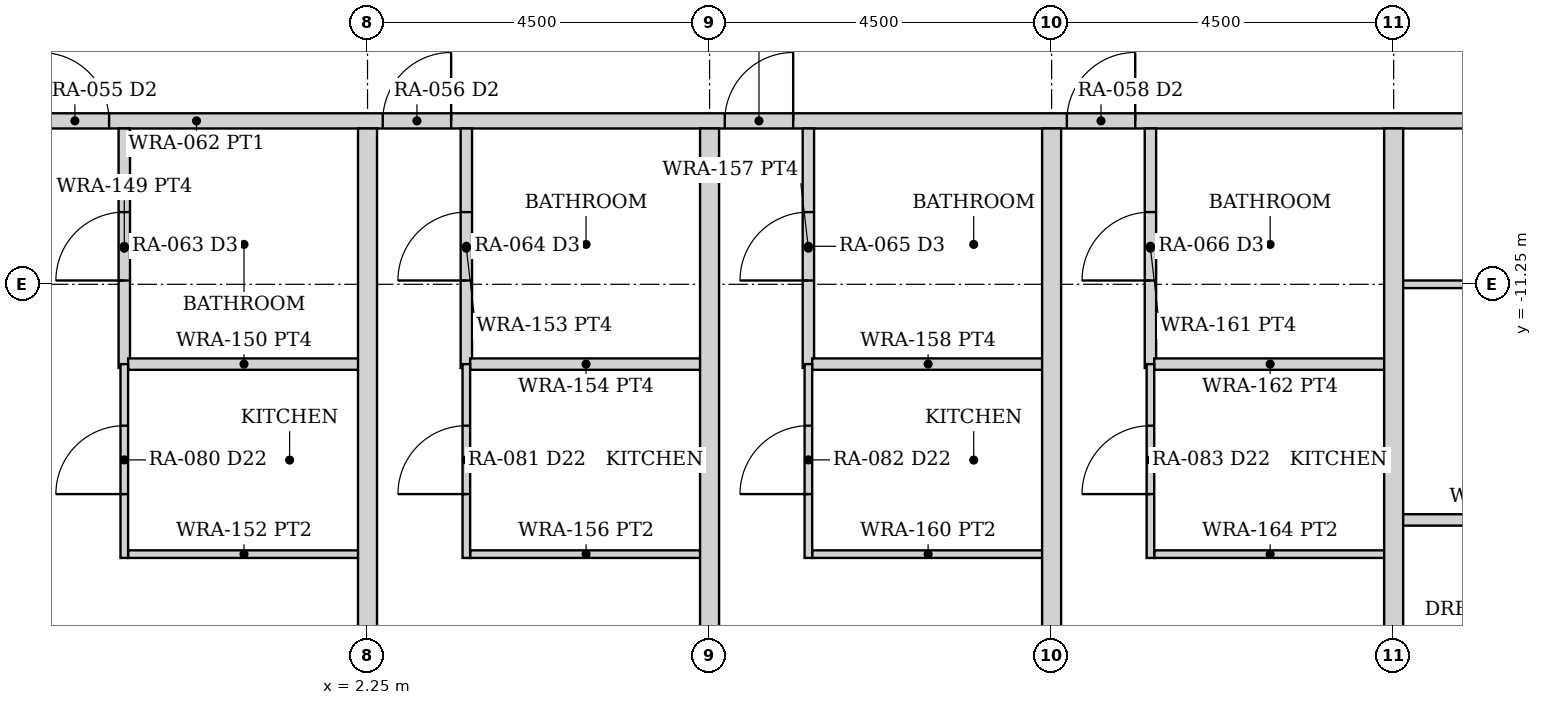
"""IFC4 building model, lengths in metres.
Left out: names, types, materials, properties, quantities, classifications, styles, units other than length and angle.
Written with IfcOpenShell. Run it as: python <this file> out.ifc"""

import sys

from ifc_helpers import new_model, si_unit, direction, frame, frame_2d, origin, place, context, subcontext, project, spatial, rectangle, extrude, element, fill, save


model = new_model("IFC4")
c1 = context("Model", 3, precision=1e-05, world=origin(), true_north=direction((0.0, 1.0)))
c2 = subcontext(c1, "Body", "Model", "MODEL_VIEW")
j1 = project(units=[si_unit("LENGTHUNIT", "METRE"), si_unit("PLANEANGLEUNIT", "RADIAN")], contexts=[c1])
p1 = place(None, origin())
s1 = spatial("IfcSite", under=j1, at=p1, CompositionType="ELEMENT")
p2 = place(p1, origin())
s2 = spatial("IfcBuilding", under=s1, at=p2, CompositionType="ELEMENT")
p3 = place(p2, frame((0.0, 0.0, 30.0)))
s3 = spatial("IfcBuildingStorey", under=s2, at=p3, CompositionType="ELEMENT", Elevation=30.0)
p4 = place(p3, frame((-24.55, -9.1, 0.0), z_axis=(0.0, 0.0, 1.0), x_axis=(1.0, 0.0, 0.0)))
e1 = element("IfcWall", 1, at=p4, inside=s3, PredefinedType="PARTITIONING", context=c2, shape_type="SweptSolid", body=[
    extrude(rectangle(XDim=49.1, YDim=0.2, at=frame_2d((24.55, 0.0))), origin(), (0.0, 0.0, 1.0), 2.373),
])
p5 = place(p4, frame((5.1, 0.0, 0.0)))
e2 = element("IfcOpeningElement", 2, at=p5, cuts=e1, PredefinedType="OPENING", context=c2, shape_type="SweptSolid", body=[
    extrude(rectangle(XDim=0.9, YDim=2.1, at=frame_2d((0.45, 1.05))), frame((0.0, 0.11, 0.0), z_axis=(0.0, -1.0, 0.0), x_axis=(1.0, 0.0, 0.0)), (0.0, 0.0, 1.0), 0.22),
])
p6 = place(p4, frame((9.0, 0.0, 0.0)))
e3 = element("IfcOpeningElement", 3, at=p6, cuts=e1, PredefinedType="OPENING", context=c2, shape_type="SweptSolid", body=[
    extrude(rectangle(XDim=0.9, YDim=2.1, at=frame_2d((0.45, 1.05))), frame((0.0, 0.11, 0.0), z_axis=(0.0, -1.0, 0.0), x_axis=(1.0, 0.0, 0.0)), (0.0, 0.0, 1.0), 0.22),
])
p7 = place(p4, frame((13.5, 0.0, 0.0)))
e4 = element("IfcOpeningElement", 4, at=p7, cuts=e1, PredefinedType="OPENING", context=c2, shape_type="SweptSolid", body=[
    extrude(rectangle(XDim=0.9, YDim=2.1, at=frame_2d((0.45, 1.05))), frame((0.0, 0.11, 0.0), z_axis=(0.0, -1.0, 0.0), x_axis=(1.0, 0.0, 0.0)), (0.0, 0.0, 1.0), 0.22),
])
p8 = place(p4, frame((18.0, 0.0, 0.0)))
e5 = element("IfcOpeningElement", 5, at=p8, cuts=e1, PredefinedType="OPENING", context=c2, shape_type="SweptSolid", body=[
    extrude(rectangle(XDim=0.9, YDim=2.1, at=frame_2d((0.45, 1.05))), frame((0.0, 0.11, 0.0), z_axis=(0.0, -1.0, 0.0), x_axis=(1.0, 0.0, 0.0)), (0.0, 0.0, 1.0), 0.22),
])
p9 = place(p4, frame((22.5, 0.0, 0.0)))
e6 = element("IfcOpeningElement", 6, at=p9, cuts=e1, PredefinedType="OPENING", context=c2, shape_type="SweptSolid", body=[
    extrude(rectangle(XDim=0.9, YDim=2.1, at=frame_2d((0.45, 1.05))), frame((0.0, 0.11, 0.0), z_axis=(0.0, -1.0, 0.0), x_axis=(1.0, 0.0, 0.0)), (0.0, 0.0, 1.0), 0.22),
])
p10 = place(p4, frame((27.0, 0.0, 0.0)))
e7 = element("IfcOpeningElement", 7, at=p10, cuts=e1, PredefinedType="OPENING", context=c2, shape_type="SweptSolid", body=[
    extrude(rectangle(XDim=0.9, YDim=2.1, at=frame_2d((0.45, 1.05))), frame((0.0, 0.11, 0.0), z_axis=(0.0, -1.0, 0.0), x_axis=(1.0, 0.0, 0.0)), (0.0, 0.0, 1.0), 0.22),
])
p11 = place(p4, frame((31.5, 0.0, 0.0)))
e8 = element("IfcOpeningElement", 8, at=p11, cuts=e1, PredefinedType="OPENING", context=c2, shape_type="SweptSolid", body=[
    extrude(rectangle(XDim=0.9, YDim=2.1, at=frame_2d((0.45, 1.05))), frame((0.0, 0.11, 0.0), z_axis=(0.0, -1.0, 0.0), x_axis=(1.0, 0.0, 0.0)), (0.0, 0.0, 1.0), 0.22),
])
p12 = place(p4, frame((36.0, 0.0, 0.0)))
e9 = element("IfcOpeningElement", 9, at=p12, cuts=e1, PredefinedType="OPENING", context=c2, shape_type="SweptSolid", body=[
    extrude(rectangle(XDim=0.9, YDim=2.1, at=frame_2d((0.45, 1.05))), frame((0.0, 0.11, 0.0), z_axis=(0.0, -1.0, 0.0), x_axis=(1.0, 0.0, 0.0)), (0.0, 0.0, 1.0), 0.22),
])
p13 = place(p4, frame((43.1, 0.0, 0.0)))
e10 = element("IfcOpeningElement", 10, at=p13, cuts=e1, PredefinedType="OPENING", context=c2, shape_type="SweptSolid", body=[
    extrude(rectangle(XDim=0.9, YDim=2.1, at=frame_2d((0.45, 1.05))), frame((0.0, 0.11, 0.0), z_axis=(0.0, -1.0, 0.0), x_axis=(1.0, 0.0, 0.0)), (0.0, 0.0, 1.0), 0.22),
])
p14 = place(p3, frame((-0.95, -12.35, 0.0), z_axis=(0.0, 0.0, 1.0), x_axis=(0.0, 1.0, 0.0)))
e11 = element("IfcWall", 11, at=p14, inside=s3, PredefinedType="PARTITIONING", context=c2, shape_type="SweptSolid", body=[
    extrude(rectangle(XDim=3.15, YDim=0.15, at=frame_2d((1.575, 0.0))), origin(), (0.0, 0.0, 1.0), 2.373),
])
p15 = place(p14, frame((1.15, 0.0, 0.0)))
e12 = element("IfcOpeningElement", 12, at=p15, cuts=e11, PredefinedType="OPENING", context=c2, shape_type="SweptSolid", body=[
    extrude(rectangle(XDim=0.9, YDim=2.1, at=frame_2d((0.45, 1.05))), frame((0.0, 0.085, 0.0), z_axis=(0.0, -1.0, 0.0), x_axis=(1.0, 0.0, 0.0)), (0.0, 0.0, 1.0), 0.17),
])
p16 = place(p3, frame((-0.9, -12.3, 0.0), z_axis=(0.0, 0.0, 1.0), x_axis=(1.0, 0.0, 0.0)))
e13 = element("IfcWall", 13, at=p16, inside=s3, PredefinedType="PARTITIONING", context=c2, shape_type="SweptSolid", body=[
    extrude(rectangle(XDim=3.05, YDim=0.15, at=frame_2d((1.525, 0.0))), origin(), (0.0, 0.0, 1.0), 2.373),
])
p17 = place(p3, frame((-0.9, -14.8, 0.0), z_axis=(0.0, 0.0, 1.0), x_axis=(1.0, 0.0, 0.0)))
e14 = element("IfcWall", 14, at=p17, inside=s3, PredefinedType="PARTITIONING", context=c2, shape_type="SweptSolid", body=[
    extrude(rectangle(XDim=3.05, YDim=0.1, at=frame_2d((1.525, 0.0))), origin(), (0.0, 0.0, 1.0), 2.373),
])
p18 = place(p3, frame((-0.95, -14.85, 0.0), z_axis=(0.0, 0.0, 1.0), x_axis=(0.0, 1.0, 0.0)))
e15 = element("IfcWall", 15, at=p18, inside=s3, PredefinedType="PARTITIONING", context=c2, shape_type="SweptSolid", body=[
    extrude(rectangle(XDim=2.55, YDim=0.1, at=frame_2d((1.275, 0.0))), origin(), (0.0, 0.0, 1.0), 2.373),
])
p19 = place(p18, frame((0.84, 0.0, 0.0)))
e16 = element("IfcOpeningElement", 16, at=p19, cuts=e15, PredefinedType="OPENING", context=c2, shape_type="SweptSolid", body=[
    extrude(rectangle(XDim=0.9, YDim=2.1, at=frame_2d((0.45, 1.05))), frame((0.0, 0.06, 0.0), z_axis=(0.0, -1.0, 0.0), x_axis=(1.0, 0.0, 0.0)), (0.0, 0.0, 1.0), 0.12),
])
p20 = place(p3, frame((3.55, -12.35, 0.0), z_axis=(0.0, 0.0, 1.0), x_axis=(0.0, 1.0, 0.0)))
e17 = element("IfcWall", 17, at=p20, inside=s3, PredefinedType="PARTITIONING", context=c2, shape_type="SweptSolid", body=[
    extrude(rectangle(XDim=3.15, YDim=0.15, at=frame_2d((1.575, 0.0))), origin(), (0.0, 0.0, 1.0), 2.373),
])
p21 = place(p20, frame((1.15, 0.0, 0.0)))
e18 = element("IfcOpeningElement", 18, at=p21, cuts=e17, PredefinedType="OPENING", context=c2, shape_type="SweptSolid", body=[
    extrude(rectangle(XDim=0.9, YDim=2.1, at=frame_2d((0.45, 1.05))), frame((0.0, 0.085, 0.0), z_axis=(0.0, -1.0, 0.0), x_axis=(1.0, 0.0, 0.0)), (0.0, 0.0, 1.0), 0.17),
])
p22 = place(p3, frame((3.6, -12.3, 0.0), z_axis=(0.0, 0.0, 1.0), x_axis=(1.0, 0.0, 0.0)))
e19 = element("IfcWall", 19, at=p22, inside=s3, PredefinedType="PARTITIONING", context=c2, shape_type="SweptSolid", body=[
    extrude(rectangle(XDim=3.05, YDim=0.15, at=frame_2d((1.525, 0.0))), origin(), (0.0, 0.0, 1.0), 2.373),
])
p23 = place(p3, frame((3.6, -14.8, 0.0), z_axis=(0.0, 0.0, 1.0), x_axis=(1.0, 0.0, 0.0)))
e20 = element("IfcWall", 20, at=p23, inside=s3, PredefinedType="PARTITIONING", context=c2, shape_type="SweptSolid", body=[
    extrude(rectangle(XDim=3.05, YDim=0.1, at=frame_2d((1.525, 0.0))), origin(), (0.0, 0.0, 1.0), 2.373),
])
p24 = place(p3, frame((3.55, -14.85, 0.0), z_axis=(0.0, 0.0, 1.0), x_axis=(0.0, 1.0, 0.0)))
e21 = element("IfcWall", 21, at=p24, inside=s3, PredefinedType="PARTITIONING", context=c2, shape_type="SweptSolid", body=[
    extrude(rectangle(XDim=2.55, YDim=0.1, at=frame_2d((1.275, 0.0))), origin(), (0.0, 0.0, 1.0), 2.373),
])
p25 = place(p24, frame((0.84, 0.0, 0.0)))
e22 = element("IfcOpeningElement", 22, at=p25, cuts=e21, PredefinedType="OPENING", context=c2, shape_type="SweptSolid", body=[
    extrude(rectangle(XDim=0.9, YDim=2.1, at=frame_2d((0.45, 1.05))), frame((0.0, 0.06, 0.0), z_axis=(0.0, -1.0, 0.0), x_axis=(1.0, 0.0, 0.0)), (0.0, 0.0, 1.0), 0.12),
])
p26 = place(p3, frame((8.05, -12.35, 0.0), z_axis=(0.0, 0.0, 1.0), x_axis=(0.0, 1.0, 0.0)))
e23 = element("IfcWall", 23, at=p26, inside=s3, PredefinedType="PARTITIONING", context=c2, shape_type="SweptSolid", body=[
    extrude(rectangle(XDim=3.15, YDim=0.15, at=frame_2d((1.575, 0.0))), origin(), (0.0, 0.0, 1.0), 2.373),
])
p27 = place(p26, frame((1.15, 0.0, 0.0)))
e24 = element("IfcOpeningElement", 24, at=p27, cuts=e23, PredefinedType="OPENING", context=c2, shape_type="SweptSolid", body=[
    extrude(rectangle(XDim=0.9, YDim=2.1, at=frame_2d((0.45, 1.05))), frame((0.0, 0.085, 0.0), z_axis=(0.0, -1.0, 0.0), x_axis=(1.0, 0.0, 0.0)), (0.0, 0.0, 1.0), 0.17),
])
p28 = place(p3, frame((8.1, -12.3, 0.0), z_axis=(0.0, 0.0, 1.0), x_axis=(1.0, 0.0, 0.0)))
e25 = element("IfcWall", 25, at=p28, inside=s3, PredefinedType="PARTITIONING", context=c2, shape_type="SweptSolid", body=[
    extrude(rectangle(XDim=3.05, YDim=0.15, at=frame_2d((1.525, 0.0))), origin(), (0.0, 0.0, 1.0), 2.373),
])
p29 = place(p3, frame((8.1, -14.8, 0.0), z_axis=(0.0, 0.0, 1.0), x_axis=(1.0, 0.0, 0.0)))
e26 = element("IfcWall", 26, at=p29, inside=s3, PredefinedType="PARTITIONING", context=c2, shape_type="SweptSolid", body=[
    extrude(rectangle(XDim=3.05, YDim=0.1, at=frame_2d((1.525, 0.0))), origin(), (0.0, 0.0, 1.0), 2.373),
])
p30 = place(p3, frame((8.05, -14.85, 0.0), z_axis=(0.0, 0.0, 1.0), x_axis=(0.0, 1.0, 0.0)))
e27 = element("IfcWall", 27, at=p30, inside=s3, PredefinedType="PARTITIONING", context=c2, shape_type="SweptSolid", body=[
    extrude(rectangle(XDim=2.55, YDim=0.1, at=frame_2d((1.275, 0.0))), origin(), (0.0, 0.0, 1.0), 2.373),
])
p31 = place(p30, frame((0.84, 0.0, 0.0)))
e28 = element("IfcOpeningElement", 28, at=p31, cuts=e27, PredefinedType="OPENING", context=c2, shape_type="SweptSolid", body=[
    extrude(rectangle(XDim=0.9, YDim=2.1, at=frame_2d((0.45, 1.05))), frame((0.0, 0.06, 0.0), z_axis=(0.0, -1.0, 0.0), x_axis=(1.0, 0.0, 0.0)), (0.0, 0.0, 1.0), 0.12),
])
p32 = place(p3, frame((12.55, -12.35, 0.0), z_axis=(0.0, 0.0, 1.0), x_axis=(0.0, 1.0, 0.0)))
e29 = element("IfcWall", 29, at=p32, inside=s3, PredefinedType="PARTITIONING", context=c2, shape_type="SweptSolid", body=[
    extrude(rectangle(XDim=3.15, YDim=0.15, at=frame_2d((1.575, 0.0))), origin(), (0.0, 0.0, 1.0), 2.373),
])
p33 = place(p32, frame((1.15, 0.0, 0.0)))
e30 = element("IfcOpeningElement", 30, at=p33, cuts=e29, PredefinedType="OPENING", context=c2, shape_type="SweptSolid", body=[
    extrude(rectangle(XDim=0.9, YDim=2.1, at=frame_2d((0.45, 1.05))), frame((0.0, 0.085, 0.0), z_axis=(0.0, -1.0, 0.0), x_axis=(1.0, 0.0, 0.0)), (0.0, 0.0, 1.0), 0.17),
])
p34 = place(p3, frame((12.6, -12.3, 0.0), z_axis=(0.0, 0.0, 1.0), x_axis=(1.0, 0.0, 0.0)))
e31 = element("IfcWall", 31, at=p34, inside=s3, PredefinedType="PARTITIONING", context=c2, shape_type="SweptSolid", body=[
    extrude(rectangle(XDim=3.05, YDim=0.15, at=frame_2d((1.525, 0.0))), origin(), (0.0, 0.0, 1.0), 2.373),
])
p35 = place(p3, frame((12.6, -14.8, 0.0), z_axis=(0.0, 0.0, 1.0), x_axis=(1.0, 0.0, 0.0)))
e32 = element("IfcWall", 32, at=p35, inside=s3, PredefinedType="PARTITIONING", context=c2, shape_type="SweptSolid", body=[
    extrude(rectangle(XDim=3.05, YDim=0.1, at=frame_2d((1.525, 0.0))), origin(), (0.0, 0.0, 1.0), 2.373),
])
p36 = place(p3, frame((12.55, -14.85, 0.0), z_axis=(0.0, 0.0, 1.0), x_axis=(0.0, 1.0, 0.0)))
e33 = element("IfcWall", 33, at=p36, inside=s3, PredefinedType="PARTITIONING", context=c2, shape_type="SweptSolid", body=[
    extrude(rectangle(XDim=2.55, YDim=0.1, at=frame_2d((1.275, 0.0))), origin(), (0.0, 0.0, 1.0), 2.373),
])
p37 = place(p36, frame((0.84, 0.0, 0.0)))
e34 = element("IfcOpeningElement", 34, at=p37, cuts=e33, PredefinedType="OPENING", context=c2, shape_type="SweptSolid", body=[
    extrude(rectangle(XDim=0.9, YDim=2.1, at=frame_2d((0.45, 1.05))), frame((0.0, 0.06, 0.0), z_axis=(0.0, -1.0, 0.0), x_axis=(1.0, 0.0, 0.0)), (0.0, 0.0, 1.0), 0.12),
])
p38 = place(p3, frame((15.85, -11.25, 0.0), z_axis=(0.0, 0.0, 1.0), x_axis=(1.0, 0.0, 0.0)))
e35 = element("IfcWall", 35, at=p38, inside=s3, PredefinedType="PARTITIONING", context=c2, shape_type="SweptSolid", body=[
    extrude(rectangle(XDim=8.5, YDim=0.1, at=frame_2d((4.25, 0.0))), origin(), (0.0, 0.0, 1.0), 2.373),
])
p39 = place(p38, frame((5.225, 0.0, 0.0)))
e36 = element("IfcOpeningElement", 36, at=p39, cuts=e35, PredefinedType="OPENING", context=c2, shape_type="SweptSolid", body=[
    extrude(rectangle(XDim=0.9, YDim=2.1, at=frame_2d((0.45, 1.05))), frame((0.0, 0.06, 0.0), z_axis=(0.0, -1.0, 0.0), x_axis=(1.0, 0.0, 0.0)), (0.0, 0.0, 1.0), 0.12),
])
p40 = place(p38, frame((7.25, 0.0, 0.0)))
e37 = element("IfcOpeningElement", 37, at=p40, cuts=e35, PredefinedType="OPENING", context=c2, shape_type="SweptSolid", body=[
    extrude(rectangle(XDim=0.9, YDim=2.1, at=frame_2d((0.45, 1.05))), frame((0.0, 0.06, 0.0), z_axis=(0.0, -1.0, 0.0), x_axis=(1.0, 0.0, 0.0)), (0.0, 0.0, 1.0), 0.12),
])
p41 = place(p38, frame((3.325, 0.0, 0.0)))
e38 = element("IfcOpeningElement", 38, at=p41, cuts=e35, PredefinedType="OPENING", context=c2, shape_type="SweptSolid", body=[
    extrude(rectangle(XDim=0.85, YDim=2.1, at=frame_2d((0.425, 1.05))), frame((0.0, 0.06, 0.0), z_axis=(0.0, -1.0, 0.0), x_axis=(1.0, 0.0, 0.0)), (0.0, 0.0, 1.0), 0.12),
])
p42 = place(p38, frame((1.08, 0.0, 0.0)))
e39 = element("IfcOpeningElement", 39, at=p42, cuts=e35, PredefinedType="OPENING", context=c2, shape_type="SweptSolid", body=[
    extrude(rectangle(XDim=0.9, YDim=2.1, at=frame_2d((0.45, 1.05))), frame((0.0, 0.06, 0.0), z_axis=(0.0, -1.0, 0.0), x_axis=(1.0, 0.0, 0.0)), (0.0, 0.0, 1.0), 0.12),
])
p43 = place(p3, frame((15.81, -14.35, 0.0), z_axis=(0.0, 0.0, 1.0), x_axis=(1.0, 0.0, 0.0)))
e40 = element("IfcWall", 40, at=p43, inside=s3, PredefinedType="PARTITIONING", context=c2, shape_type="SweptSolid", body=[
    extrude(rectangle(XDim=3.14, YDim=0.15, at=frame_2d((1.57, 0.0))), origin(), (0.0, 0.0, 1.0), 2.373),
])
for number, where, z_axis, x_axis in (
    (41, (2.25, -24.35, 0.0), (0.0, 0.0, 1.0), (0.0, 1.0, 0.0)),
    (42, (6.75, -24.35, 0.0), (0.0, 0.0, 1.0), (0.0, 1.0, 0.0)),
    (43, (11.25, -24.35, 0.0), (0.0, 0.0, 1.0), (0.0, 1.0, 0.0)),
    (44, (15.75, -24.35, 0.0), (0.0, 0.0, 1.0), (0.0, 1.0, 0.0)),
):
    element("IfcWall", number, at=place(p3, frame(where, z_axis=z_axis, x_axis=x_axis)), inside=s3, PredefinedType="PARTITIONING", context=c2, shape_type="SweptSolid", body=[
        extrude(rectangle(XDim=15.15, YDim=0.25, at=frame_2d((7.575, 0.0))), origin(), (0.0, 0.0, 1.0), 2.373),
    ])
p44 = place(p9, origin())
e45 = element("IfcDoor", 45, at=p44, inside=s3, OperationType="SINGLE_SWING_LEFT", PredefinedType="DOOR", context=c2, shape_type="SweptSolid", body=[
    extrude(rectangle(XDim=0.9, YDim=2.1, at=frame_2d((0.45, 1.05))), frame((0.0, 0.025, 0.0), z_axis=(0.0, -1.0, 0.0), x_axis=(1.0, 0.0, 0.0)), (0.0, 0.0, 1.0), 0.05),
])
fill(e6, e45)
p45 = place(p15, origin())
e46 = element("IfcDoor", 46, at=p45, inside=s3, OperationType="SINGLE_SWING_LEFT", PredefinedType="DOOR", context=c2, shape_type="SweptSolid", body=[
    extrude(rectangle(XDim=0.9, YDim=2.1, at=frame_2d((0.45, 1.05))), frame((0.0, 0.025, 0.0), z_axis=(0.0, -1.0, 0.0), x_axis=(1.0, 0.0, 0.0)), (0.0, 0.0, 1.0), 0.05),
])
fill(e12, e46)
p46 = place(p19, origin())
e47 = element("IfcDoor", 47, at=p46, inside=s3, OperationType="SINGLE_SWING_LEFT", PredefinedType="DOOR", context=c2, shape_type="SweptSolid", body=[
    extrude(rectangle(XDim=0.9, YDim=2.1, at=frame_2d((0.45, 1.05))), frame((0.0, 0.025, 0.0), z_axis=(0.0, -1.0, 0.0), x_axis=(1.0, 0.0, 0.0)), (0.0, 0.0, 1.0), 0.05),
])
fill(e16, e47)
p47 = place(p10, origin())
e48 = element("IfcDoor", 48, at=p47, inside=s3, OperationType="SINGLE_SWING_RIGHT", PredefinedType="DOOR", context=c2, shape_type="SweptSolid", body=[
    extrude(rectangle(XDim=0.9, YDim=2.1, at=frame_2d((0.45, 1.05))), frame((0.0, 0.025, 0.0), z_axis=(0.0, -1.0, 0.0), x_axis=(1.0, 0.0, 0.0)), (0.0, 0.0, 1.0), 0.05),
])
fill(e7, e48)
p48 = place(p21, origin())
e49 = element("IfcDoor", 49, at=p48, inside=s3, OperationType="SINGLE_SWING_LEFT", PredefinedType="DOOR", context=c2, shape_type="SweptSolid", body=[
    extrude(rectangle(XDim=0.9, YDim=2.1, at=frame_2d((0.45, 1.05))), frame((0.0, 0.025, 0.0), z_axis=(0.0, -1.0, 0.0), x_axis=(1.0, 0.0, 0.0)), (0.0, 0.0, 1.0), 0.05),
])
fill(e18, e49)
p49 = place(p25, origin())
e50 = element("IfcDoor", 50, at=p49, inside=s3, OperationType="SINGLE_SWING_LEFT", PredefinedType="DOOR", context=c2, shape_type="SweptSolid", body=[
    extrude(rectangle(XDim=0.9, YDim=2.1, at=frame_2d((0.45, 1.05))), frame((0.0, 0.025, 0.0), z_axis=(0.0, -1.0, 0.0), x_axis=(1.0, 0.0, 0.0)), (0.0, 0.0, 1.0), 0.05),
])
fill(e22, e50)
p50 = place(p11, origin())
e51 = element("IfcDoor", 51, at=p50, inside=s3, OperationType="SINGLE_SWING_RIGHT", PredefinedType="DOOR", context=c2, shape_type="SweptSolid", body=[
    extrude(rectangle(XDim=0.9, YDim=2.1, at=frame_2d((0.45, 1.05))), frame((0.0, 0.025, 0.0), z_axis=(0.0, -1.0, 0.0), x_axis=(1.0, 0.0, 0.0)), (0.0, 0.0, 1.0), 0.05),
])
fill(e8, e51)
p51 = place(p27, origin())
e52 = element("IfcDoor", 52, at=p51, inside=s3, OperationType="SINGLE_SWING_LEFT", PredefinedType="DOOR", context=c2, shape_type="SweptSolid", body=[
    extrude(rectangle(XDim=0.9, YDim=2.1, at=frame_2d((0.45, 1.05))), frame((0.0, 0.025, 0.0), z_axis=(0.0, -1.0, 0.0), x_axis=(1.0, 0.0, 0.0)), (0.0, 0.0, 1.0), 0.05),
])
fill(e24, e52)
p52 = place(p31, origin())
e53 = element("IfcDoor", 53, at=p52, inside=s3, OperationType="SINGLE_SWING_LEFT", PredefinedType="DOOR", context=c2, shape_type="SweptSolid", body=[
    extrude(rectangle(XDim=0.9, YDim=2.1, at=frame_2d((0.45, 1.05))), frame((0.0, 0.025, 0.0), z_axis=(0.0, -1.0, 0.0), x_axis=(1.0, 0.0, 0.0)), (0.0, 0.0, 1.0), 0.05),
])
fill(e28, e53)
p53 = place(p12, origin())
e54 = element("IfcDoor", 54, at=p53, inside=s3, OperationType="SINGLE_SWING_RIGHT", PredefinedType="DOOR", context=c2, shape_type="SweptSolid", body=[
    extrude(rectangle(XDim=0.9, YDim=2.1, at=frame_2d((0.45, 1.05))), frame((0.0, 0.025, 0.0), z_axis=(0.0, -1.0, 0.0), x_axis=(1.0, 0.0, 0.0)), (0.0, 0.0, 1.0), 0.05),
])
fill(e9, e54)
p54 = place(p33, origin())
e55 = element("IfcDoor", 55, at=p54, inside=s3, OperationType="SINGLE_SWING_LEFT", PredefinedType="DOOR", context=c2, shape_type="SweptSolid", body=[
    extrude(rectangle(XDim=0.9, YDim=2.1, at=frame_2d((0.45, 1.05))), frame((0.0, 0.025, 0.0), z_axis=(0.0, -1.0, 0.0), x_axis=(1.0, 0.0, 0.0)), (0.0, 0.0, 1.0), 0.05),
])
fill(e30, e55)
p55 = place(p37, origin())
e56 = element("IfcDoor", 56, at=p55, inside=s3, OperationType="SINGLE_SWING_LEFT", PredefinedType="DOOR", context=c2, shape_type="SweptSolid", body=[
    extrude(rectangle(XDim=0.9, YDim=2.1, at=frame_2d((0.45, 1.05))), frame((0.0, 0.025, 0.0), z_axis=(0.0, -1.0, 0.0), x_axis=(1.0, 0.0, 0.0)), (0.0, 0.0, 1.0), 0.05),
])
fill(e34, e56)
save(model, sys.argv[1])
